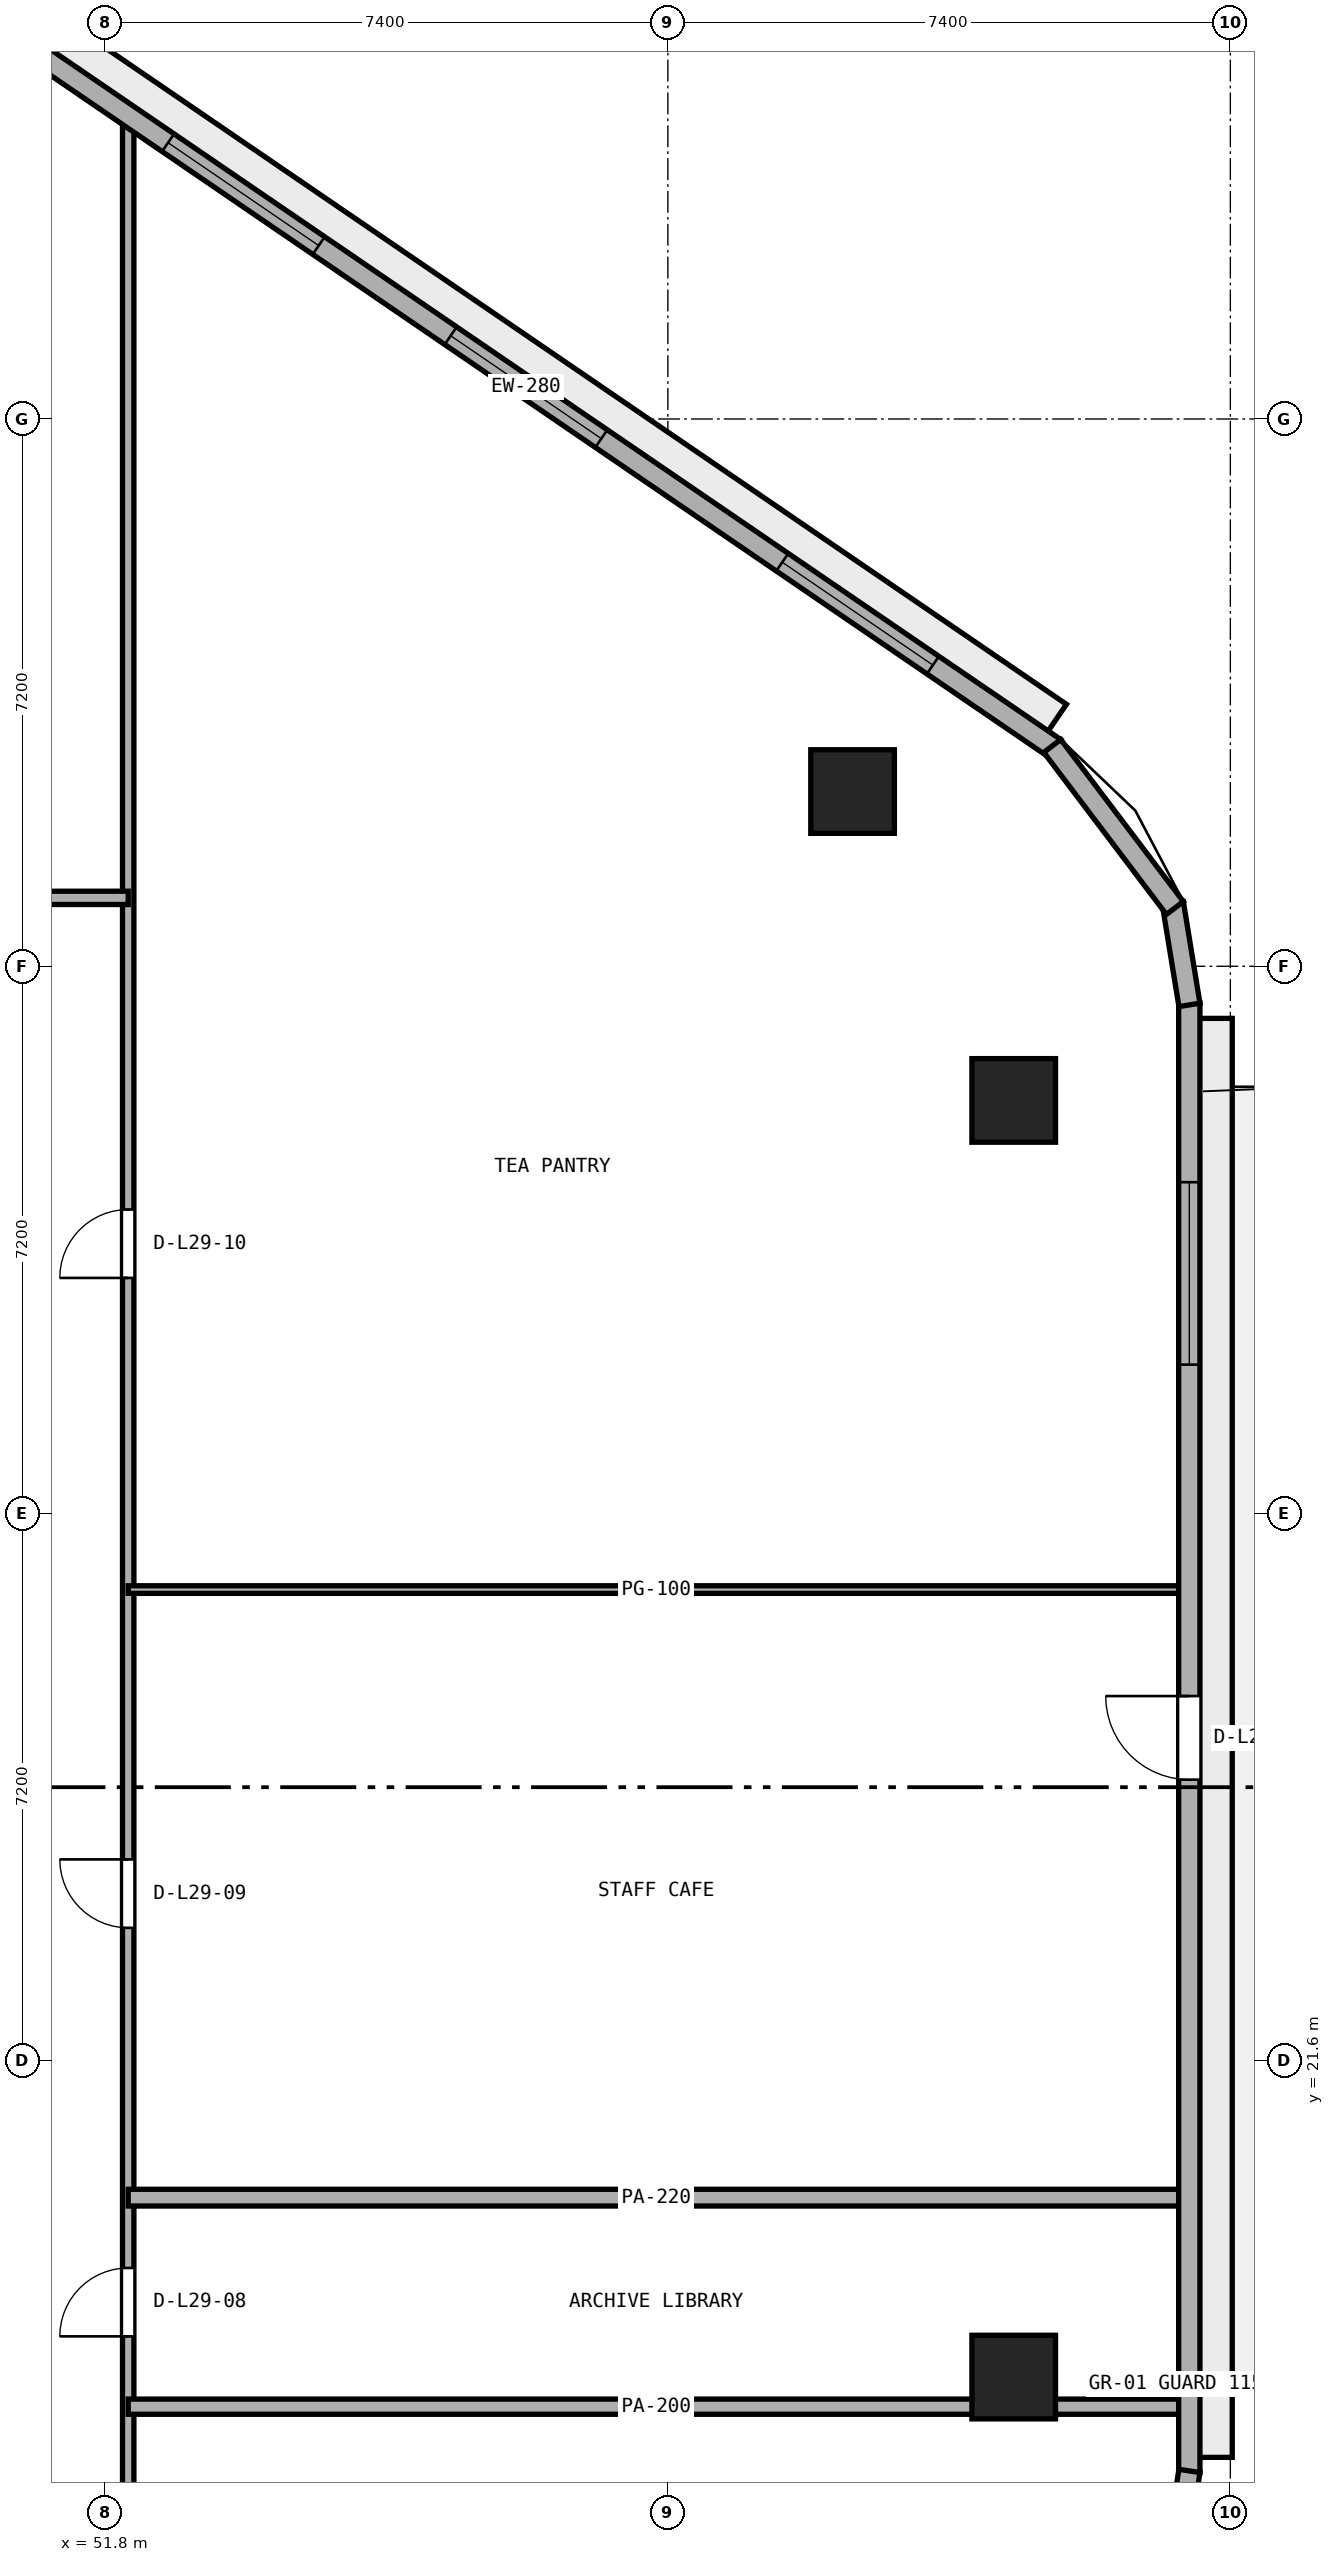
"""IFC4 building model, lengths in metres.
Left out: names, types, materials, properties, quantities, classifications, styles, units other than length and angle.
Written with IfcOpenShell. Run it as: python <this file> out.ifc"""

import sys

from ifc_helpers import new_model, si_unit, direction, frame, frame_2d, origin, origin_2d, place, context, subcontext, project, spatial, rectangle, extrude, element, fill, save


model = new_model("IFC4")
c1 = context("Model", 3, precision=1e-05, world=origin(), true_north=direction((0.0, 1.0)))
c2 = subcontext(c1, "Body", "Model", "MODEL_VIEW")
j1 = project(units=[si_unit("LENGTHUNIT", "METRE"), si_unit("PLANEANGLEUNIT", "RADIAN")], contexts=[c1])
p1 = place(None, origin())
s1 = spatial("IfcSite", under=j1, at=p1, CompositionType="ELEMENT")
p2 = place(p1, origin())
s2 = spatial("IfcBuilding", under=s1, at=p2, CompositionType="ELEMENT")
p3 = place(p2, frame((0.0, 0.0, 116.2)))
s3 = spatial("IfcBuildingStorey", under=s2, at=p3, CompositionType="ELEMENT", Elevation=116.2)
for number, where, z_axis, x_axis in (
    (1, (63.75, 17.44, 0.0), (0.0, 0.0, 1.0), (1.0, 0.0, 0.0)),
    (2, (63.75, 34.235, 0.0), (0.0, 0.0, 1.0), (1.0, 0.0, 0.0)),
    (3, (61.63, 38.299, 0.0), (0.0, 0.0, 1.0), (1.0, 0.0, 0.0)),
):
    element("IfcColumn", number, at=place(p3, frame(where, z_axis=z_axis, x_axis=x_axis)), inside=s3, PredefinedType="COLUMN", context=c2, shape_type="SweptSolid", body=[
        extrude(rectangle(XDim=1.1, YDim=1.1, at=origin_2d()), origin(), (0.0, 0.0, 1.0), 3.8),
    ])
p4 = place(p3, frame((52.1, 13.5, 0.0), z_axis=(0.0, 0.0, 1.0), x_axis=(0.0, 1.0, 0.0)))
e4 = element("IfcWall", 4, at=p4, inside=s3, PredefinedType="PARTITIONING", context=c2, shape_type="SweptSolid", body=[
    extrude(rectangle(XDim=33.723, YDim=0.15, at=frame_2d((16.861, 0.0))), origin(), (0.0, 0.0, 1.0), 3.4),
])
p5 = place(p4, frame((4.475, 0.0, 0.0)))
e5 = element("IfcOpeningElement", 5, at=p5, cuts=e4, PredefinedType="OPENING", context=c2, shape_type="SweptSolid", body=[
    extrude(rectangle(XDim=0.9, YDim=2.1, at=frame_2d((0.45, 1.05))), frame((0.0, 0.085, 0.0), z_axis=(0.0, -1.0, 0.0), x_axis=(1.0, 0.0, 0.0)), (0.0, 0.0, 1.0), 0.17),
])
p6 = place(p4, frame((9.85, 0.0, 0.0)))
e6 = element("IfcOpeningElement", 6, at=p6, cuts=e4, PredefinedType="OPENING", context=c2, shape_type="SweptSolid", body=[
    extrude(rectangle(XDim=0.9, YDim=2.1, at=frame_2d((0.45, 1.05))), frame((0.0, 0.085, 0.0), z_axis=(0.0, -1.0, 0.0), x_axis=(1.0, 0.0, 0.0)), (0.0, 0.0, 1.0), 0.17),
])
p7 = place(p4, frame((18.4, 0.0, 0.0)))
e7 = element("IfcOpeningElement", 7, at=p7, cuts=e4, PredefinedType="OPENING", context=c2, shape_type="SweptSolid", body=[
    extrude(rectangle(XDim=0.9, YDim=2.1, at=frame_2d((0.45, 1.05))), frame((0.0, 0.085, 0.0), z_axis=(0.0, -1.0, 0.0), x_axis=(1.0, 0.0, 0.0)), (0.0, 0.0, 1.0), 0.17),
])
p8 = place(p3, frame((52.1, 17.05, 0.0), z_axis=(0.0, 0.0, 1.0), x_axis=(1.0, 0.0, 0.0)))
e8 = element("IfcWall", 8, at=p8, inside=s3, PredefinedType="PARTITIONING", context=c2, shape_type="SweptSolid", body=[
    extrude(rectangle(XDim=13.895, YDim=0.2, at=frame_2d((6.948, 0.0))), origin(), (0.0, 0.0, 1.0), 3.4),
])
p9 = place(p3, frame((52.1, 19.8, 0.0), z_axis=(0.0, 0.0, 1.0), x_axis=(1.0, 0.0, 0.0)))
e9 = element("IfcWall", 9, at=p9, inside=s3, PredefinedType="PARTITIONING", context=c2, shape_type="SweptSolid", body=[
    extrude(rectangle(XDim=13.895, YDim=0.22, at=frame_2d((6.948, 0.0))), origin(), (0.0, 0.0, 1.0), 3.4),
])
p10 = place(p3, frame((52.1, 27.8, 0.0), z_axis=(0.0, 0.0, 1.0), x_axis=(1.0, 0.0, 0.0)))
e10 = element("IfcWall", 10, at=p10, inside=s3, PredefinedType="PARTITIONING", context=c2, shape_type="SweptSolid", body=[
    extrude(rectangle(XDim=13.895, YDim=0.1, at=frame_2d((6.948, 0.0))), origin(), (0.0, 0.0, 1.0), 3.4),
])
p11 = place(p3, frame((21.9, 36.9, 0.0), z_axis=(0.0, 0.0, 1.0), x_axis=(1.0, 0.0, 0.0)))
e11 = element("IfcWall", 11, at=p11, inside=s3, PredefinedType="PARTITIONING", context=c2, shape_type="SweptSolid", body=[
    extrude(rectangle(XDim=30.2, YDim=0.175, at=frame_2d((15.1, 0.0))), origin(), (0.0, 0.0, 1.0), 3.4),
])
p12 = place(p11, frame((4.87, 0.0, 0.0)))
e12 = element("IfcOpeningElement", 12, at=p12, cuts=e11, PredefinedType="OPENING", context=c2, shape_type="SweptSolid", body=[
    extrude(rectangle(XDim=1.0, YDim=2.12, at=frame_2d((0.5, 1.06))), frame((0.0, 0.097, 0.0), z_axis=(0.0, -1.0, 0.0), x_axis=(1.0, 0.0, 0.0)), (0.0, 0.0, 1.0), 0.195),
])
p13 = place(p11, frame((15.75, 0.0, 0.0)))
e13 = element("IfcOpeningElement", 13, at=p13, cuts=e11, PredefinedType="OPENING", context=c2, shape_type="SweptSolid", body=[
    extrude(rectangle(XDim=1.0, YDim=2.12, at=frame_2d((0.5, 1.06))), frame((0.0, 0.097, 0.0), z_axis=(0.0, -1.0, 0.0), x_axis=(1.0, 0.0, 0.0)), (0.0, 0.0, 1.0), 0.195),
])
p14 = place(p11, frame((25.48, 0.0, 0.0)))
e14 = element("IfcOpeningElement", 14, at=p14, cuts=e11, PredefinedType="OPENING", context=c2, shape_type="SweptSolid", body=[
    extrude(rectangle(XDim=1.0, YDim=2.12, at=frame_2d((0.5, 1.06))), frame((0.0, 0.097, 0.0), z_axis=(0.0, -1.0, 0.0), x_axis=(1.0, 0.0, 0.0)), (0.0, 0.0, 1.0), 0.195),
])
p15 = place(p3, frame((66.06, 16.183, 0.0), z_axis=(0.0, 0.0, 1.0), x_axis=(0.0, 1.0, 0.0)))
e15 = element("IfcWall", 15, at=p15, inside=s3, PredefinedType="STANDARD", context=c2, shape_type="SweptSolid", body=[
    extrude(rectangle(XDim=19.331, YDim=0.28, at=frame_2d((9.666, 0.0))), origin(), (0.0, 0.0, 1.0), 3.4),
])
p16 = place(p15, frame((9.115, 0.0, 0.0)))
e16 = element("IfcOpeningElement", 16, at=p16, cuts=e15, PredefinedType="OPENING", context=c2, shape_type="SweptSolid", body=[
    extrude(rectangle(XDim=1.1, YDim=2.2, at=frame_2d((0.55, 1.1))), frame((0.0, 0.15, 0.0), z_axis=(0.0, -1.0, 0.0), x_axis=(1.0, 0.0, 0.0)), (0.0, 0.0, 1.0), 0.3),
])
p17 = place(p15, frame((14.576, 0.0, 0.9)))
e17 = element("IfcOpeningElement", 17, at=p17, cuts=e15, PredefinedType="OPENING", context=c2, shape_type="SweptSolid", body=[
    extrude(rectangle(XDim=2.4, YDim=1.75, at=frame_2d((1.2, 0.875))), frame((0.0, 0.15, 0.0), z_axis=(0.0, -1.0, 0.0), x_axis=(1.0, 0.0, 0.0)), (0.0, 0.0, 1.0), 0.3),
])
p18 = place(p3, frame((64.29, 38.867, 0.0), z_axis=(0.0, 0.0, 1.0), x_axis=(-0.825755550159, 0.564028165416, 0.0)))
e18 = element("IfcWall", 18, at=p18, inside=s3, PredefinedType="STANDARD", context=c2, shape_type="SweptSolid", body=[
    extrude(rectangle(XDim=16.848, YDim=0.28, at=frame_2d((8.424, 0.0))), origin(), (0.0, 0.0, 1.0), 3.4),
])
p19 = place(p18, frame((1.941, 0.0, 0.9)))
e19 = element("IfcOpeningElement", 19, at=p19, cuts=e18, PredefinedType="OPENING", context=c2, shape_type="SweptSolid", body=[
    extrude(rectangle(XDim=2.4, YDim=1.75, at=frame_2d((1.2, 0.875))), frame((0.0, 0.15, 0.0), z_axis=(0.0, -1.0, 0.0), x_axis=(1.0, 0.0, 0.0)), (0.0, 0.0, 1.0), 0.3),
])
p20 = place(p18, frame((7.224, 0.0, 0.9)))
e20 = element("IfcOpeningElement", 20, at=p20, cuts=e18, PredefinedType="OPENING", context=c2, shape_type="SweptSolid", body=[
    extrude(rectangle(XDim=2.4, YDim=1.75, at=frame_2d((1.2, 0.875))), frame((0.0, 0.15, 0.0), z_axis=(0.0, -1.0, 0.0), x_axis=(1.0, 0.0, 0.0)), (0.0, 0.0, 1.0), 0.3),
])
p21 = place(p18, frame((11.727, 0.0, 0.9)))
e21 = element("IfcOpeningElement", 21, at=p21, cuts=e18, PredefinedType="OPENING", context=c2, shape_type="SweptSolid", body=[
    extrude(rectangle(XDim=2.4, YDim=1.75, at=frame_2d((1.2, 0.875))), frame((0.0, 0.15, 0.0), z_axis=(0.0, -1.0, 0.0), x_axis=(1.0, 0.0, 0.0)), (0.0, 0.0, 1.0), 0.3),
])
p22 = place(p3, frame((65.867, 14.943, 0.0), z_axis=(0.0, 0.0, 1.0), x_axis=(0.152014078361, 0.988378328364, 0.0)))
e22 = element("IfcWall", 22, at=p22, inside=s3, PredefinedType="STANDARD", context=c2, shape_type="SweptSolid", body=[
    extrude(rectangle(XDim=1.277, YDim=0.28, at=frame_2d((0.638, 0.0))), origin(), (0.0, 0.0, 1.0), 3.4),
])
p23 = place(p3, frame((66.062, 35.492, 0.0), z_axis=(0.0, 0.0, 1.0), x_axis=(-0.161182073582, 0.986924687682, 0.0)))
e23 = element("IfcWall", 23, at=p23, inside=s3, PredefinedType="STANDARD", context=c2, shape_type="SweptSolid", body=[
    extrude(rectangle(XDim=1.354, YDim=0.28, at=frame_2d((0.677, 0.0))), origin(), (0.0, 0.0, 1.0), 3.4),
])
p24 = place(p3, frame((65.87, 36.767, 0.0), z_axis=(0.0, 0.0, 1.0), x_axis=(-0.603370463754, 0.797461023166, 0.0)))
e24 = element("IfcWall", 24, at=p24, inside=s3, PredefinedType="STANDARD", context=c2, shape_type="SweptSolid", body=[
    extrude(rectangle(XDim=2.673, YDim=0.28, at=frame_2d((1.336, 0.0))), origin(), (0.0, 0.0, 1.0), 3.4),
])
p25 = place(p5, origin())
e25 = element("IfcDoor", 25, at=p25, inside=s3, OperationType="SINGLE_SWING_LEFT", PredefinedType="DOOR", context=c2, shape_type="SweptSolid", body=[
    extrude(rectangle(XDim=0.9, YDim=2.1, at=frame_2d((0.45, 1.05))), frame((0.0, 0.025, 0.0), z_axis=(0.0, -1.0, 0.0), x_axis=(1.0, 0.0, 0.0)), (0.0, 0.0, 1.0), 0.05),
])
fill(e5, e25)
p26 = place(p6, origin())
e26 = element("IfcDoor", 26, at=p26, inside=s3, OperationType="SINGLE_SWING_RIGHT", PredefinedType="DOOR", context=c2, shape_type="SweptSolid", body=[
    extrude(rectangle(XDim=0.9, YDim=2.1, at=frame_2d((0.45, 1.05))), frame((0.0, 0.025, 0.0), z_axis=(0.0, -1.0, 0.0), x_axis=(1.0, 0.0, 0.0)), (0.0, 0.0, 1.0), 0.05),
])
fill(e6, e26)
p27 = place(p7, origin())
e27 = element("IfcDoor", 27, at=p27, inside=s3, OperationType="SINGLE_SWING_LEFT", PredefinedType="DOOR", context=c2, shape_type="SweptSolid", body=[
    extrude(rectangle(XDim=0.9, YDim=2.1, at=frame_2d((0.45, 1.05))), frame((0.0, 0.025, 0.0), z_axis=(0.0, -1.0, 0.0), x_axis=(1.0, 0.0, 0.0)), (0.0, 0.0, 1.0), 0.05),
])
fill(e7, e27)
p28 = place(p16, origin())
e28 = element("IfcDoor", 28, at=p28, inside=s3, OperationType="SINGLE_SWING_RIGHT", PredefinedType="DOOR", context=c2, shape_type="SweptSolid", body=[
    extrude(rectangle(XDim=1.1, YDim=2.2, at=frame_2d((0.55, 1.1))), frame((0.0, 0.025, 0.0), z_axis=(0.0, -1.0, 0.0), x_axis=(1.0, 0.0, 0.0)), (0.0, 0.0, 1.0), 0.05),
])
fill(e16, e28)
p29 = place(p17, origin())
e29 = element("IfcWindow", 29, at=p29, inside=s3, PartitioningType="SINGLE_PANEL", PredefinedType="WINDOW", context=c2, shape_type="SweptSolid", body=[
    extrude(rectangle(XDim=2.4, YDim=1.75, at=frame_2d((1.2, 0.875))), frame((0.0, 0.03, 0.0), z_axis=(0.0, -1.0, 0.0), x_axis=(1.0, 0.0, 0.0)), (0.0, 0.0, 1.0), 0.06),
])
fill(e17, e29)
p30 = place(p19, origin())
e30 = element("IfcWindow", 30, at=p30, inside=s3, PartitioningType="SINGLE_PANEL", PredefinedType="WINDOW", context=c2, shape_type="SweptSolid", body=[
    extrude(rectangle(XDim=2.4, YDim=1.75, at=frame_2d((1.2, 0.875))), frame((0.0, 0.03, 0.0), z_axis=(0.0, -1.0, 0.0), x_axis=(1.0, 0.0, 0.0)), (0.0, 0.0, 1.0), 0.06),
])
fill(e19, e30)
p31 = place(p20, origin())
e31 = element("IfcWindow", 31, at=p31, inside=s3, PartitioningType="SINGLE_PANEL", PredefinedType="WINDOW", context=c2, shape_type="SweptSolid", body=[
    extrude(rectangle(XDim=2.4, YDim=1.75, at=frame_2d((1.2, 0.875))), frame((0.0, 0.03, 0.0), z_axis=(0.0, -1.0, 0.0), x_axis=(1.0, 0.0, 0.0)), (0.0, 0.0, 1.0), 0.06),
])
fill(e20, e31)
p32 = place(p21, origin())
e32 = element("IfcWindow", 32, at=p32, inside=s3, PartitioningType="SINGLE_PANEL", PredefinedType="WINDOW", context=c2, shape_type="SweptSolid", body=[
    extrude(rectangle(XDim=2.4, YDim=1.75, at=frame_2d((1.2, 0.875))), frame((0.0, 0.03, 0.0), z_axis=(0.0, -1.0, 0.0), x_axis=(1.0, 0.0, 0.0)), (0.0, 0.0, 1.0), 0.06),
])
fill(e21, e32)
save(model, sys.argv[1])
